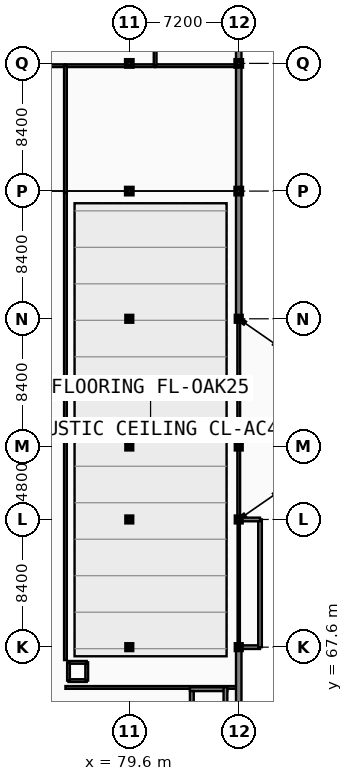
"""IFC4 building model, lengths in metres.
Left out: names, types, materials, properties, quantities, classifications, styles, units other than length and angle.
Written with IfcOpenShell. Run it as: python <this file> out.ifc"""

import sys

from ifc_helpers import new_model, si_unit, direction, frame, frame_2d, origin, origin_2d, place, context, subcontext, project, spatial, rectangle, extrude, element, fill, save


model = new_model("IFC4")
c1 = context("Model", 3, precision=1e-05, world=origin(), true_north=direction((0.0, 1.0)))
c2 = subcontext(c1, "Body", "Model", "MODEL_VIEW")
j1 = project(units=[si_unit("LENGTHUNIT", "METRE"), si_unit("PLANEANGLEUNIT", "RADIAN")], contexts=[c1])
p1 = place(None, origin())
s1 = spatial("IfcSite", under=j1, at=p1, CompositionType="ELEMENT")
p2 = place(p1, origin())
s2 = spatial("IfcBuilding", under=s1, at=p2, CompositionType="ELEMENT")
p3 = place(p2, frame((0.0, 0.0, 17.7)))
s3 = spatial("IfcBuildingStorey", under=s2, at=p3, CompositionType="ELEMENT", Elevation=17.7)
for number, where, z_axis, x_axis in (
    (1, (79.6, 67.6, 0.0), (0.0, 0.0, 1.0), (1.0, 0.0, 0.0)),
    (2, (79.6, 76.0, 0.0), (0.0, 0.0, 1.0), (1.0, 0.0, 0.0)),
    (3, (79.6, 80.8, 0.0), (0.0, 0.0, 1.0), (1.0, 0.0, 0.0)),
    (4, (79.6, 89.2, 0.0), (0.0, 0.0, 1.0), (1.0, 0.0, 0.0)),
):
    element("IfcColumn", number, at=place(p3, frame(where, z_axis=z_axis, x_axis=x_axis)), inside=s3, PredefinedType="COLUMN", context=c2, shape_type="SweptSolid", body=[
        extrude(rectangle(XDim=0.36, YDim=0.36, at=origin_2d()), origin(), (0.0, 0.0, 1.0), 3.9),
    ])
for number, where, z_axis, x_axis in (
    (5, (79.6, 97.6, 0.0), (0.0, 0.0, 1.0), (1.0, 0.0, 0.0)),
    (6, (79.6, 106.0, 0.0), (0.0, 0.0, 1.0), (1.0, 0.0, 0.0)),
):
    element("IfcColumn", number, at=place(p3, frame(where, z_axis=z_axis, x_axis=x_axis)), inside=s3, PredefinedType="COLUMN", context=c2, shape_type="SweptSolid", body=[
        extrude(rectangle(XDim=0.4, YDim=0.4, at=origin_2d()), origin(), (0.0, 0.0, 1.0), 3.9),
    ])
for number, where, z_axis, x_axis in (
    (7, (86.8, 67.6, 0.0), (0.0, 0.0, 1.0), (1.0, 0.0, 0.0)),
    (8, (86.8, 76.0, 0.0), (0.0, 0.0, 1.0), (1.0, 0.0, 0.0)),
    (9, (86.8, 80.8, 0.0), (0.0, 0.0, 1.0), (1.0, 0.0, 0.0)),
    (10, (86.8, 89.2, 0.0), (0.0, 0.0, 1.0), (1.0, 0.0, 0.0)),
):
    element("IfcColumn", number, at=place(p3, frame(where, z_axis=z_axis, x_axis=x_axis)), inside=s3, PredefinedType="COLUMN", context=c2, shape_type="SweptSolid", body=[
        extrude(rectangle(XDim=0.36, YDim=0.36, at=origin_2d()), origin(), (0.0, 0.0, 1.0), 3.9),
    ])
for number, where, z_axis, x_axis in (
    (11, (86.8, 97.6, 0.0), (0.0, 0.0, 1.0), (1.0, 0.0, 0.0)),
    (12, (86.8, 106.0, 0.0), (0.0, 0.0, 1.0), (1.0, 0.0, 0.0)),
):
    element("IfcColumn", number, at=place(p3, frame(where, z_axis=z_axis, x_axis=x_axis)), inside=s3, PredefinedType="COLUMN", context=c2, shape_type="SweptSolid", body=[
        extrude(rectangle(XDim=0.4, YDim=0.4, at=origin_2d()), origin(), (0.0, 0.0, 1.0), 3.9),
    ])
p4 = place(p3, frame((86.8, 67.6, 0.0), z_axis=(0.0, 0.0, 1.0), x_axis=(0.0, 1.0, 0.0)))
e13 = element("IfcWall", 13, at=p4, inside=s3, PredefinedType="PARTITIONING", context=c2, shape_type="SweptSolid", body=[
    extrude(rectangle(XDim=8.4, YDim=0.15, at=frame_2d((4.2, 0.0))), origin(), (0.0, 0.0, 1.0), 3.32),
])
p5 = place(p4, frame((3.7, 0.0, -0.01)))
e14 = element("IfcOpeningElement", 14, at=p5, cuts=e13, PredefinedType="OPENING", context=c2, shape_type="SweptSolid", body=[
    extrude(rectangle(XDim=1.0, YDim=2.16, at=frame_2d((0.5, 1.08))), frame((0.0, 0.085, 0.0), z_axis=(0.0, -1.0, 0.0), x_axis=(1.0, 0.0, 0.0)), (0.0, 0.0, 1.0), 0.17),
])
p6 = place(p3, frame((60.3, 105.85, 0.0), z_axis=(0.0, 0.0, 1.0), x_axis=(1.0, 0.0, 0.0)))
e15 = element("IfcWall", 15, at=p6, inside=s3, PredefinedType="PARTITIONING", context=c2, shape_type="SweptSolid", body=[
    extrude(rectangle(XDim=15.1, YDim=0.18, at=frame_2d((7.55, 0.0))), origin(), (0.0, 0.0, 1.0), 3.21),
])
p7 = place(p6, frame((7.05, 0.0, -0.01)))
e16 = element("IfcOpeningElement", 16, at=p7, cuts=e15, PredefinedType="OPENING", context=c2, shape_type="SweptSolid", body=[
    extrude(rectangle(XDim=1.0, YDim=2.16, at=frame_2d((0.5, 1.08))), frame((0.0, 0.1, 0.0), z_axis=(0.0, -1.0, 0.0), x_axis=(1.0, 0.0, 0.0)), (0.0, 0.0, 1.0), 0.2),
])
p8 = place(p3, frame((75.4, 105.85, 0.0), z_axis=(0.0, 0.0, 1.0), x_axis=(1.0, 0.0, 0.0)))
e17 = element("IfcWall", 17, at=p8, inside=s3, PredefinedType="PARTITIONING", context=c2, shape_type="SweptSolid", body=[
    extrude(rectangle(XDim=5.9, YDim=0.18, at=frame_2d((2.95, 0.0))), origin(), (0.0, 0.0, 1.0), 3.21),
])
p9 = place(p3, frame((81.3, 105.85, 0.0), z_axis=(0.0, 0.0, 1.0), x_axis=(1.0, 0.0, 0.0)))
e18 = element("IfcWall", 18, at=p9, inside=s3, PredefinedType="PARTITIONING", context=c2, shape_type="SweptSolid", body=[
    extrude(rectangle(XDim=5.36, YDim=0.18, at=frame_2d((2.68, 0.0))), origin(), (0.0, 0.0, 1.0), 3.21),
])
p10 = place(p9, frame((2.18, 0.0, -0.01)))
e19 = element("IfcOpeningElement", 19, at=p10, cuts=e18, PredefinedType="OPENING", context=c2, shape_type="SweptSolid", body=[
    extrude(rectangle(XDim=1.0, YDim=2.16, at=frame_2d((0.5, 1.08))), frame((0.0, 0.1, 0.0), z_axis=(0.0, -1.0, 0.0), x_axis=(1.0, 0.0, 0.0)), (0.0, 0.0, 1.0), 0.2),
])
p11 = place(p3, frame((81.3, 105.85, 0.0), z_axis=(0.0, 0.0, 1.0), x_axis=(0.0, 1.0, 0.0)))
e20 = element("IfcWall", 20, at=p11, inside=s3, PredefinedType="PARTITIONING", context=c2, shape_type="SweptSolid", body=[
    extrude(rectangle(XDim=4.15, YDim=0.18, at=frame_2d((2.075, 0.0))), origin(), (0.0, 0.0, 1.0), 3.3),
])
p12 = place(p11, frame((1.575, 0.0, -0.01)))
e21 = element("IfcOpeningElement", 21, at=p12, cuts=e20, PredefinedType="OPENING", context=c2, shape_type="SweptSolid", body=[
    extrude(rectangle(XDim=1.0, YDim=2.16, at=frame_2d((0.5, 1.08))), frame((0.0, 0.1, 0.0), z_axis=(0.0, -1.0, 0.0), x_axis=(1.0, 0.0, 0.0)), (0.0, 0.0, 1.0), 0.2),
])
p13 = place(p3, frame((75.4, 64.95, 0.0), z_axis=(0.0, 0.0, 1.0), x_axis=(1.0, 0.0, 0.0)))
e22 = element("IfcWall", 22, at=p13, inside=s3, PredefinedType="PARTITIONING", context=c2, shape_type="SweptSolid", body=[
    extrude(rectangle(XDim=11.26, YDim=0.18, at=frame_2d((5.63, 0.0))), origin(), (0.0, 0.0, 1.0), 3.23),
])
p14 = place(p3, frame((75.4, 66.75, 0.0), z_axis=(0.0, 0.0, 1.0), x_axis=(0.0, 1.0, 0.0)))
e23 = element("IfcWall", 23, at=p14, inside=s3, PredefinedType="PARTITIONING", context=c2, shape_type="SweptSolid", body=[
    extrude(rectangle(XDim=30.75, YDim=0.18, at=frame_2d((15.375, 0.0))), origin(), (0.0, 0.0, 1.0), 3.32),
])
p15 = place(p14, frame((6.413, 0.0, -0.01)))
e24 = element("IfcOpeningElement", 24, at=p15, cuts=e23, PredefinedType="OPENING", context=c2, shape_type="SweptSolid", body=[
    extrude(rectangle(XDim=1.6, YDim=2.21, at=frame_2d((0.8, 1.105))), frame((0.0, 0.1, 0.0), z_axis=(0.0, -1.0, 0.0), x_axis=(1.0, 0.0, 0.0)), (0.0, 0.0, 1.0), 0.2),
])
p16 = place(p3, frame((75.4, 97.5, 0.0), z_axis=(0.0, 0.0, 1.0), x_axis=(0.0, 1.0, 0.0)))
e25 = element("IfcWall", 25, at=p16, inside=s3, PredefinedType="PARTITIONING", context=c2, shape_type="SweptSolid", body=[
    extrude(rectangle(XDim=8.35, YDim=0.18, at=frame_2d((4.175, 0.0))), origin(), (0.0, 0.0, 1.0), 3.3),
])
p17 = place(p3, frame((86.8, 76.0, 0.0), z_axis=(0.0, 0.0, 1.0), x_axis=(0.0, 1.0, 0.0)))
e26 = element("IfcWall", 26, at=p17, inside=s3, PredefinedType="PARTITIONING", context=c2, shape_type="SweptSolid", body=[
    extrude(rectangle(XDim=13.2, YDim=0.18, at=frame_2d((6.6, 0.0))), origin(), (0.0, 0.0, 1.0), 3.32),
])
p18 = place(p17, frame((5.8, 0.0, -0.01)))
e27 = element("IfcOpeningElement", 27, at=p18, cuts=e26, PredefinedType="OPENING", context=c2, shape_type="SweptSolid", body=[
    extrude(rectangle(XDim=1.6, YDim=2.21, at=frame_2d((0.8, 1.105))), frame((0.0, 0.1, 0.0), z_axis=(0.0, -1.0, 0.0), x_axis=(1.0, 0.0, 0.0)), (0.0, 0.0, 1.0), 0.2),
])
p19 = place(p3, frame((86.8, 97.6, 0.0), z_axis=(0.0, 0.0, 1.0), x_axis=(0.0, 1.0, 0.0)))
e28 = element("IfcWall", 28, at=p19, inside=s3, PredefinedType="SOLIDWALL", context=c2, shape_type="SweptSolid", body=[
    extrude(rectangle(XDim=8.4, YDim=0.36, at=frame_2d((4.2, 0.0))), origin(), (0.0, 0.0, 1.0), 3.3),
])
p20 = place(p19, frame((0.46, 0.0, 0.75)))
e29 = element("IfcOpeningElement", 29, at=p20, cuts=e28, PredefinedType="OPENING", context=c2, shape_type="SweptSolid", body=[
    extrude(rectangle(XDim=1.55, YDim=2.3, at=frame_2d((0.775, 1.15))), frame((0.0, 0.19, 0.0), z_axis=(0.0, -1.0, 0.0), x_axis=(1.0, 0.0, 0.0)), (0.0, 0.0, 1.0), 0.38),
])
p21 = place(p19, frame((6.26, 0.0, 0.75)))
e30 = element("IfcOpeningElement", 30, at=p21, cuts=e28, PredefinedType="OPENING", context=c2, shape_type="SweptSolid", body=[
    extrude(rectangle(XDim=1.55, YDim=2.3, at=frame_2d((0.775, 1.15))), frame((0.0, 0.19, 0.0), z_axis=(0.0, -1.0, 0.0), x_axis=(1.0, 0.0, 0.0)), (0.0, 0.0, 1.0), 0.38),
])
p22 = place(p3, frame((86.8, 106.0, 0.0), z_axis=(0.0, 0.0, 1.0), x_axis=(0.0, 1.0, 0.0)))
e31 = element("IfcWall", 31, at=p22, inside=s3, PredefinedType="SOLIDWALL", context=c2, shape_type="SweptSolid", body=[
    extrude(rectangle(XDim=9.0, YDim=0.36, at=frame_2d((4.5, 0.0))), origin(), (0.0, 0.0, 1.0), 3.3),
])
p23 = place(p22, frame((0.46, 0.0, 0.75)))
e32 = element("IfcOpeningElement", 32, at=p23, cuts=e31, PredefinedType="OPENING", context=c2, shape_type="SweptSolid", body=[
    extrude(rectangle(XDim=1.55, YDim=2.3, at=frame_2d((0.775, 1.15))), frame((0.0, 0.19, 0.0), z_axis=(0.0, -1.0, 0.0), x_axis=(1.0, 0.0, 0.0)), (0.0, 0.0, 1.0), 0.38),
])
p24 = place(p22, frame((6.86, 0.0, 0.75)))
e33 = element("IfcOpeningElement", 33, at=p24, cuts=e31, PredefinedType="OPENING", context=c2, shape_type="SweptSolid", body=[
    extrude(rectangle(XDim=1.55, YDim=2.3, at=frame_2d((0.775, 1.15))), frame((0.0, 0.19, 0.0), z_axis=(0.0, -1.0, 0.0), x_axis=(1.0, 0.0, 0.0)), (0.0, 0.0, 1.0), 0.38),
])
p25 = place(p3, frame((86.8, 59.2, 0.0), z_axis=(0.0, 0.0, 1.0), x_axis=(0.0, 1.0, 0.0)))
e34 = element("IfcWall", 34, at=p25, inside=s3, PredefinedType="SOLIDWALL", context=c2, shape_type="SweptSolid", body=[
    extrude(rectangle(XDim=8.4, YDim=0.36, at=frame_2d((4.2, 0.0))), origin(), (0.0, 0.0, 1.0), 3.32),
])
p26 = place(p25, frame((0.46, 0.0, 0.75)))
e35 = element("IfcOpeningElement", 35, at=p26, cuts=e34, PredefinedType="OPENING", context=c2, shape_type="SweptSolid", body=[
    extrude(rectangle(XDim=1.55, YDim=2.3, at=frame_2d((0.775, 1.15))), frame((0.0, 0.19, 0.0), z_axis=(0.0, -1.0, 0.0), x_axis=(1.0, 0.0, 0.0)), (0.0, 0.0, 1.0), 0.38),
])
p27 = place(p25, frame((6.26, 0.0, 0.75)))
e36 = element("IfcOpeningElement", 36, at=p27, cuts=e34, PredefinedType="OPENING", context=c2, shape_type="SweptSolid", body=[
    extrude(rectangle(XDim=1.55, YDim=2.3, at=frame_2d((0.775, 1.15))), frame((0.0, 0.19, 0.0), z_axis=(0.0, -1.0, 0.0), x_axis=(1.0, 0.0, 0.0)), (0.0, 0.0, 1.0), 0.38),
])
p28 = place(p3, frame((86.8, 89.2, 0.0), z_axis=(0.0, 0.0, 1.0), x_axis=(0.0, 1.0, 0.0)))
e37 = element("IfcWall", 37, at=p28, inside=s3, PredefinedType="SOLIDWALL", context=c2, shape_type="SweptSolid", body=[
    extrude(rectangle(XDim=8.4, YDim=0.36, at=frame_2d((4.2, 0.0))), origin(), (0.0, 0.0, 1.0), 3.32),
])
p29 = place(p28, frame((0.46, 0.0, 0.75)))
e38 = element("IfcOpeningElement", 38, at=p29, cuts=e37, PredefinedType="OPENING", context=c2, shape_type="SweptSolid", body=[
    extrude(rectangle(XDim=1.55, YDim=2.3, at=frame_2d((0.775, 1.15))), frame((0.0, 0.19, 0.0), z_axis=(0.0, -1.0, 0.0), x_axis=(1.0, 0.0, 0.0)), (0.0, 0.0, 1.0), 0.38),
])
p30 = place(p28, frame((6.26, 0.0, 0.75)))
e39 = element("IfcOpeningElement", 39, at=p30, cuts=e37, PredefinedType="OPENING", context=c2, shape_type="SweptSolid", body=[
    extrude(rectangle(XDim=1.55, YDim=2.3, at=frame_2d((0.775, 1.15))), frame((0.0, 0.19, 0.0), z_axis=(0.0, -1.0, 0.0), x_axis=(1.0, 0.0, 0.0)), (0.0, 0.0, 1.0), 0.38),
])
for number, where, z_axis, x_axis in (
    (40, (87.03, 76.159, 0.0), (0.0, 0.0, 1.0), (0.822, 0.569, 0.0)),
    (41, (87.211, 88.915, 0.0), (0.0, 0.0, 1.0), (-0.822, 0.569, 0.0)),
):
    element("IfcWall", number, at=place(p3, frame(where, z_axis=z_axis, x_axis=x_axis)), inside=s3, PredefinedType="SOLIDWALL", context=c2, shape_type="SweptSolid", body=[
        extrude(rectangle(XDim=0.22, YDim=0.24, at=frame_2d((0.11, 0.0))), origin(), (0.0, 0.0, 1.0), 3.32),
    ])
p31 = place(p3, frame((86.8, 67.6, 0.0), z_axis=(0.0, 0.0, 1.0), x_axis=(1.0, 0.0, 0.0)))
e42 = element("IfcWall", 42, at=p31, inside=s3, PredefinedType="SOLIDWALL", context=c2, shape_type="SweptSolid", body=[
    extrude(rectangle(XDim=1.4, YDim=0.24, at=frame_2d((0.7, 0.0))), origin(), (0.0, 0.0, 1.0), 3.32),
])
p32 = place(p3, frame((88.2, 67.6, 0.0), z_axis=(0.0, 0.0, 1.0), x_axis=(0.0, 1.0, 0.0)))
e43 = element("IfcWall", 43, at=p32, inside=s3, PredefinedType="SOLIDWALL", context=c2, shape_type="SweptSolid", body=[
    extrude(rectangle(XDim=8.4, YDim=0.24, at=frame_2d((4.2, 0.0))), origin(), (0.0, 0.0, 1.0), 3.32),
])
p33 = place(p32, frame((0.46, 0.0, 0.65)))
e44 = element("IfcOpeningElement", 44, at=p33, cuts=e43, PredefinedType="OPENING", context=c2, shape_type="SweptSolid", body=[
    extrude(rectangle(XDim=2.4, YDim=2.1, at=frame_2d((1.2, 1.05))), frame((0.0, 0.13, 0.0), z_axis=(0.0, -1.0, 0.0), x_axis=(1.0, 0.0, 0.0)), (0.0, 0.0, 1.0), 0.26),
])
p34 = place(p32, frame((5.46, 0.0, 0.65)))
e45 = element("IfcOpeningElement", 45, at=p34, cuts=e43, PredefinedType="OPENING", context=c2, shape_type="SweptSolid", body=[
    extrude(rectangle(XDim=2.4, YDim=2.1, at=frame_2d((1.2, 1.05))), frame((0.0, 0.13, 0.0), z_axis=(0.0, -1.0, 0.0), x_axis=(1.0, 0.0, 0.0)), (0.0, 0.0, 1.0), 0.26),
])
p35 = place(p3, frame((88.2, 76.0, 0.0), z_axis=(0.0, 0.0, 1.0), x_axis=(-1.0, 0.0, 0.0)))
e46 = element("IfcWall", 46, at=p35, inside=s3, PredefinedType="SOLIDWALL", context=c2, shape_type="SweptSolid", body=[
    extrude(rectangle(XDim=1.4, YDim=0.24, at=frame_2d((0.7, 0.0))), origin(), (0.0, 0.0, 1.0), 3.32),
])
p36 = place(p3, frame((83.59, 64.835, 0.0), z_axis=(0.0, 0.0, 1.0), x_axis=(1.0, 0.0, 0.0)))
e47 = element("IfcWall", 47, at=p36, inside=s3, PredefinedType="SHEAR", context=c2, shape_type="SweptSolid", body=[
    extrude(rectangle(XDim=2.46, YDim=0.25, at=frame_2d((1.23, 0.0))), origin(), (0.0, 0.0, 1.0), 3.9),
])
p37 = place(p3, frame((83.715, 62.25, 0.0), z_axis=(0.0, 0.0, 1.0), x_axis=(0.0, 1.0, 0.0)))
e48 = element("IfcWall", 48, at=p37, inside=s3, PredefinedType="SHEAR", context=c2, shape_type="SweptSolid", body=[
    extrude(rectangle(XDim=2.46, YDim=0.25, at=frame_2d((1.23, 0.0))), origin(), (0.0, 0.0, 1.0), 3.9),
])
p38 = place(p37, frame((0.68, 0.0, -0.01)))
e49 = element("IfcOpeningElement", 49, at=p38, cuts=e48, PredefinedType="OPENING", context=c2, shape_type="SweptSolid", body=[
    extrude(rectangle(XDim=1.1, YDim=2.16, at=frame_2d((0.55, 1.08))), frame((0.0, 0.135, 0.0), z_axis=(0.0, -1.0, 0.0), x_axis=(1.0, 0.0, 0.0)), (0.0, 0.0, 1.0), 0.27),
])
p39 = place(p3, frame((85.925, 62.25, 0.0), z_axis=(0.0, 0.0, 1.0), x_axis=(0.0, 1.0, 0.0)))
e50 = element("IfcWall", 50, at=p39, inside=s3, PredefinedType="SHEAR", context=c2, shape_type="SweptSolid", body=[
    extrude(rectangle(XDim=2.71, YDim=0.25, at=frame_2d((1.355, 0.0))), origin(), (0.0, 0.0, 1.0), 3.9),
])
p40 = place(p3, frame((75.6, 65.4, 0.0), z_axis=(0.0, 0.0, 1.0), x_axis=(1.0, 0.0, 0.0)))
e51 = element("IfcWall", 51, at=p40, inside=s3, PredefinedType="SOLIDWALL", context=c2, shape_type="SweptSolid", body=[
    extrude(rectangle(XDim=1.2, YDim=0.18, at=frame_2d((0.6, 0.0))), origin(), (0.0, 0.0, 1.0), 3.69),
])
p41 = place(p3, frame((76.8, 65.4, 0.0), z_axis=(0.0, 0.0, 1.0), x_axis=(0.0, 1.0, 0.0)))
e52 = element("IfcWall", 52, at=p41, inside=s3, PredefinedType="SOLIDWALL", context=c2, shape_type="SweptSolid", body=[
    extrude(rectangle(XDim=1.2, YDim=0.18, at=frame_2d((0.6, 0.0))), origin(), (0.0, 0.0, 1.0), 3.69),
])
p42 = place(p3, frame((76.8, 66.6, 0.0), z_axis=(0.0, 0.0, 1.0), x_axis=(-1.0, 0.0, 0.0)))
e53 = element("IfcWall", 53, at=p42, inside=s3, PredefinedType="SOLIDWALL", context=c2, shape_type="SweptSolid", body=[
    extrude(rectangle(XDim=1.2, YDim=0.18, at=frame_2d((0.6, 0.0))), origin(), (0.0, 0.0, 1.0), 3.69),
])
p43 = place(p3, frame((75.6, 66.6, 0.0), z_axis=(0.0, 0.0, 1.0), x_axis=(0.0, -1.0, 0.0)))
e54 = element("IfcWall", 54, at=p43, inside=s3, PredefinedType="SOLIDWALL", context=c2, shape_type="SweptSolid", body=[
    extrude(rectangle(XDim=1.2, YDim=0.18, at=frame_2d((0.6, 0.0))), origin(), (0.0, 0.0, 1.0), 3.69),
])
p44 = place(p43, frame((0.2, 0.0, -0.01)))
e55 = element("IfcOpeningElement", 55, at=p44, cuts=e54, PredefinedType="OPENING", context=c2, shape_type="SweptSolid", body=[
    extrude(rectangle(XDim=0.8, YDim=2.06, at=frame_2d((0.4, 1.03))), frame((0.0, 0.1, 0.0), z_axis=(0.0, -1.0, 0.0), x_axis=(1.0, 0.0, 0.0)), (0.0, 0.0, 1.0), 0.2),
])
p45 = place(p5, frame((0.0, 0.0, 0.01)))
e56 = element("IfcDoor", 56, at=p45, inside=s3, OperationType="SINGLE_SWING_RIGHT", PredefinedType="DOOR", context=c2, shape_type="SweptSolid", body=[
    extrude(rectangle(XDim=1.0, YDim=2.15, at=frame_2d((0.5, 1.075))), frame((0.0, 0.025, 0.0), z_axis=(0.0, -1.0, 0.0), x_axis=(1.0, 0.0, 0.0)), (0.0, 0.0, 1.0), 0.05),
])
fill(e14, e56)
p46 = place(p10, frame((0.0, 0.0, 0.01)))
e57 = element("IfcDoor", 57, at=p46, inside=s3, OperationType="SINGLE_SWING_RIGHT", PredefinedType="DOOR", context=c2, shape_type="SweptSolid", body=[
    extrude(rectangle(XDim=1.0, YDim=2.15, at=frame_2d((0.5, 1.075))), frame((0.0, 0.025, 0.0), z_axis=(0.0, -1.0, 0.0), x_axis=(1.0, 0.0, 0.0)), (0.0, 0.0, 1.0), 0.05),
])
fill(e19, e57)
p47 = place(p15, frame((0.0, 0.0, 0.01)))
e58 = element("IfcDoor", 58, at=p47, inside=s3, OperationType="DOUBLE_SWING_LEFT", PredefinedType="DOOR", context=c2, shape_type="SweptSolid", body=[
    extrude(rectangle(XDim=1.6, YDim=2.2, at=frame_2d((0.8, 1.1))), frame((0.0, 0.025, 0.0), z_axis=(0.0, -1.0, 0.0), x_axis=(1.0, 0.0, 0.0)), (0.0, 0.0, 1.0), 0.05),
])
fill(e24, e58)
p48 = place(p18, frame((1.6, 0.0, 0.01), z_axis=(0.0, 0.0, 1.0), x_axis=(-1.0, 0.0, 0.0)))
e59 = element("IfcDoor", 59, at=p48, inside=s3, OperationType="DOUBLE_SWING_LEFT", PredefinedType="DOOR", context=c2, shape_type="SweptSolid", body=[
    extrude(rectangle(XDim=1.6, YDim=2.2, at=frame_2d((0.8, 1.1))), frame((0.0, 0.025, 0.0), z_axis=(0.0, -1.0, 0.0), x_axis=(1.0, 0.0, 0.0)), (0.0, 0.0, 1.0), 0.05),
])
fill(e27, e59)
p49 = place(p20, origin())
e60 = element("IfcWindow", 60, at=p49, inside=s3, PartitioningType="DOUBLE_PANEL_HORIZONTAL", PredefinedType="WINDOW", context=c2, shape_type="SweptSolid", body=[
    extrude(rectangle(XDim=1.55, YDim=2.3, at=frame_2d((0.775, 1.15))), frame((0.0, 0.03, 0.0), z_axis=(0.0, -1.0, 0.0), x_axis=(1.0, 0.0, 0.0)), (0.0, 0.0, 1.0), 0.06),
])
fill(e29, e60)
p50 = place(p21, origin())
e61 = element("IfcWindow", 61, at=p50, inside=s3, PartitioningType="DOUBLE_PANEL_HORIZONTAL", PredefinedType="WINDOW", context=c2, shape_type="SweptSolid", body=[
    extrude(rectangle(XDim=1.55, YDim=2.3, at=frame_2d((0.775, 1.15))), frame((0.0, 0.03, 0.0), z_axis=(0.0, -1.0, 0.0), x_axis=(1.0, 0.0, 0.0)), (0.0, 0.0, 1.0), 0.06),
])
fill(e30, e61)
p51 = place(p23, origin())
e62 = element("IfcWindow", 62, at=p51, inside=s3, PartitioningType="DOUBLE_PANEL_HORIZONTAL", PredefinedType="WINDOW", context=c2, shape_type="SweptSolid", body=[
    extrude(rectangle(XDim=1.55, YDim=2.3, at=frame_2d((0.775, 1.15))), frame((0.0, 0.03, 0.0), z_axis=(0.0, -1.0, 0.0), x_axis=(1.0, 0.0, 0.0)), (0.0, 0.0, 1.0), 0.06),
])
fill(e32, e62)
p52 = place(p27, origin())
e63 = element("IfcWindow", 63, at=p52, inside=s3, PartitioningType="DOUBLE_PANEL_HORIZONTAL", PredefinedType="WINDOW", context=c2, shape_type="SweptSolid", body=[
    extrude(rectangle(XDim=1.55, YDim=2.3, at=frame_2d((0.775, 1.15))), frame((0.0, 0.03, 0.0), z_axis=(0.0, -1.0, 0.0), x_axis=(1.0, 0.0, 0.0)), (0.0, 0.0, 1.0), 0.06),
])
fill(e36, e63)
p53 = place(p29, origin())
e64 = element("IfcWindow", 64, at=p53, inside=s3, PartitioningType="DOUBLE_PANEL_HORIZONTAL", PredefinedType="WINDOW", context=c2, shape_type="SweptSolid", body=[
    extrude(rectangle(XDim=1.55, YDim=2.3, at=frame_2d((0.775, 1.15))), frame((0.0, 0.03, 0.0), z_axis=(0.0, -1.0, 0.0), x_axis=(1.0, 0.0, 0.0)), (0.0, 0.0, 1.0), 0.06),
])
fill(e38, e64)
p54 = place(p30, origin())
e65 = element("IfcWindow", 65, at=p54, inside=s3, PartitioningType="DOUBLE_PANEL_HORIZONTAL", PredefinedType="WINDOW", context=c2, shape_type="SweptSolid", body=[
    extrude(rectangle(XDim=1.55, YDim=2.3, at=frame_2d((0.775, 1.15))), frame((0.0, 0.03, 0.0), z_axis=(0.0, -1.0, 0.0), x_axis=(1.0, 0.0, 0.0)), (0.0, 0.0, 1.0), 0.06),
])
fill(e39, e65)
p55 = place(p33, origin())
e66 = element("IfcWindow", 66, at=p55, inside=s3, PartitioningType="TRIPLE_PANEL_VERTICAL", PredefinedType="WINDOW", context=c2, shape_type="SweptSolid", body=[
    extrude(rectangle(XDim=2.4, YDim=2.1, at=frame_2d((1.2, 1.05))), frame((0.0, 0.03, 0.0), z_axis=(0.0, -1.0, 0.0), x_axis=(1.0, 0.0, 0.0)), (0.0, 0.0, 1.0), 0.06),
])
fill(e44, e66)
p56 = place(p34, origin())
e67 = element("IfcWindow", 67, at=p56, inside=s3, PartitioningType="TRIPLE_PANEL_VERTICAL", PredefinedType="WINDOW", context=c2, shape_type="SweptSolid", body=[
    extrude(rectangle(XDim=2.4, YDim=2.1, at=frame_2d((1.2, 1.05))), frame((0.0, 0.03, 0.0), z_axis=(0.0, -1.0, 0.0), x_axis=(1.0, 0.0, 0.0)), (0.0, 0.0, 1.0), 0.06),
])
fill(e45, e67)
p57 = place(p44, frame((0.0, 0.0, 0.01)))
e68 = element("IfcDoor", 68, at=p57, inside=s3, OperationType="SINGLE_SWING_LEFT", PredefinedType="DOOR", context=c2, shape_type="SweptSolid", body=[
    extrude(rectangle(XDim=0.8, YDim=2.05, at=frame_2d((0.4, 1.025))), frame((0.0, 0.025, 0.0), z_axis=(0.0, -1.0, 0.0), x_axis=(1.0, 0.0, 0.0)), (0.0, 0.0, 1.0), 0.05),
])
fill(e55, e68)
save(model, sys.argv[1])
